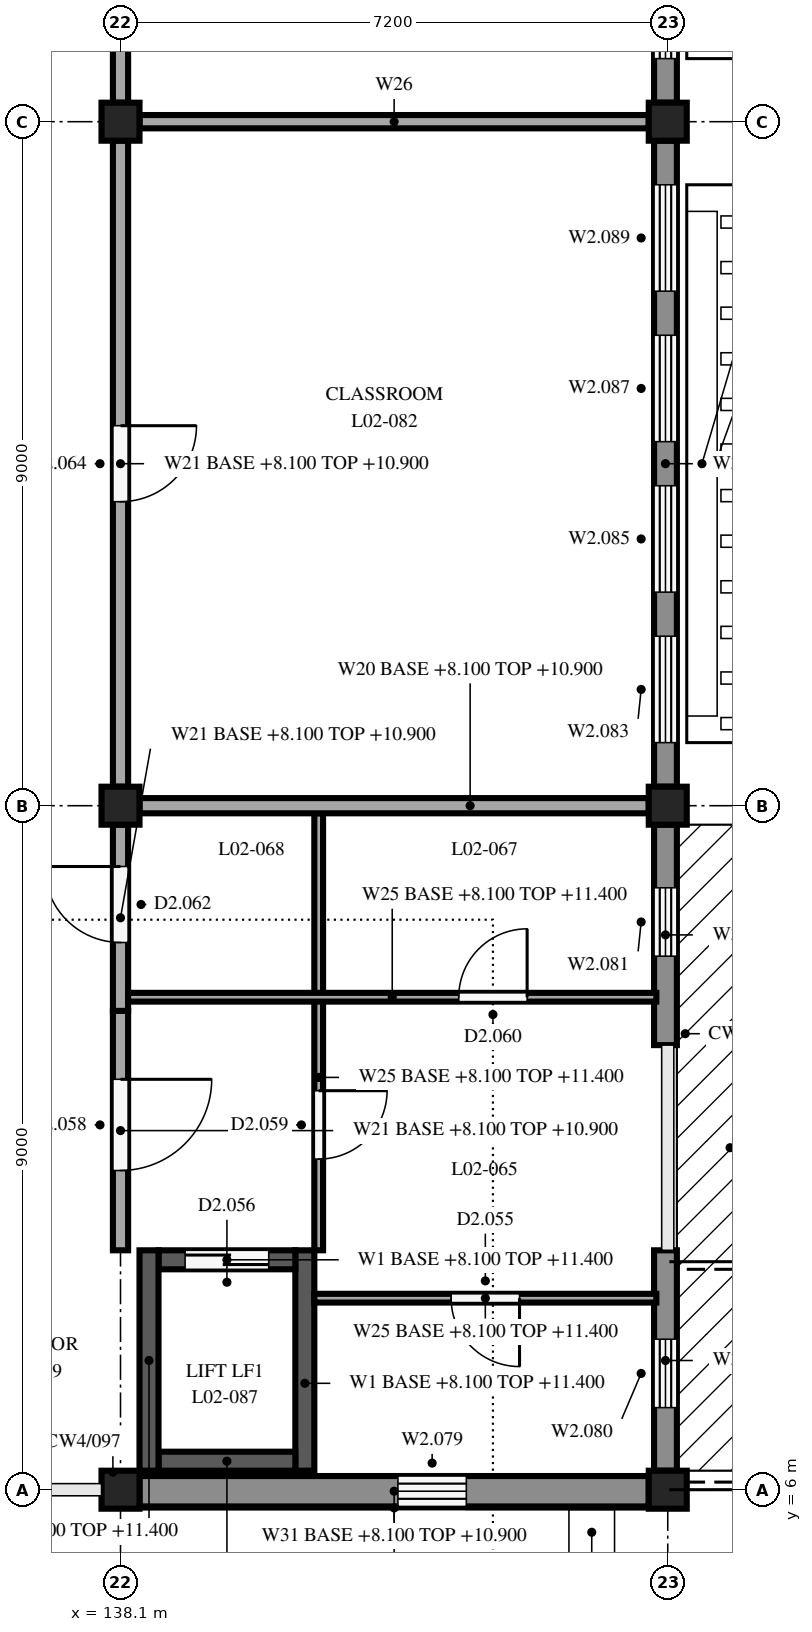
"""IFC4 building model, lengths in metres.
Left out: names, types, materials, properties, quantities, classifications, styles, units other than length and angle.
Written with IfcOpenShell. Run it as: python <this file> out.ifc"""

import sys

from ifc_helpers import new_model, si_unit, direction, frame, frame_2d, origin, origin_2d, place, context, subcontext, project, spatial, rectangle, extrude, element, fill, save


model = new_model("IFC4")
c1 = context("Model", 3, precision=1e-05, world=origin(), true_north=direction((0.0, 1.0)))
c2 = subcontext(c1, "Body", "Model", "MODEL_VIEW")
j1 = project(units=[si_unit("LENGTHUNIT", "METRE"), si_unit("PLANEANGLEUNIT", "RADIAN")], contexts=[c1])
p1 = place(None, origin())
s1 = spatial("IfcSite", under=j1, at=p1, CompositionType="ELEMENT")
p2 = place(p1, origin())
s2 = spatial("IfcBuilding", under=s1, at=p2, CompositionType="ELEMENT")
p3 = place(p2, frame((0.0, 0.0, 8.1)))
s3 = spatial("IfcBuildingStorey", under=s2, at=p3, CompositionType="ELEMENT", Elevation=8.1)
for number, where, z_axis, x_axis in (
    (1, (138.1, 6.0, 0.0), (0.0, 0.0, 1.0), (1.0, 0.0, 0.0)),
    (2, (138.1, 15.0, 0.0), (0.0, 0.0, 1.0), (1.0, 0.0, 0.0)),
    (3, (138.1, 24.0, 0.0), (0.0, 0.0, 1.0), (1.0, 0.0, 0.0)),
    (4, (145.3, 6.0, 0.0), (0.0, 0.0, 1.0), (1.0, 0.0, 0.0)),
    (5, (145.3, 15.0, 0.0), (0.0, 0.0, 1.0), (1.0, 0.0, 0.0)),
    (6, (145.3, 24.0, 0.0), (0.0, 0.0, 1.0), (1.0, 0.0, 0.0)),
):
    element("IfcColumn", number, at=place(p3, frame(where, z_axis=z_axis, x_axis=x_axis)), inside=s3, PredefinedType="COLUMN", context=c2, shape_type="SweptSolid", body=[
        extrude(rectangle(XDim=0.5, YDim=0.5, at=origin_2d()), origin(), (0.0, 0.0, 1.0), 3.3),
    ])
for number, where, z_axis, x_axis in (
    (7, (138.475, 6.25, 0.0), (0.0, 0.0, 1.0), (0.0, 1.0, 0.0)),
    (8, (140.525, 6.25, 0.0), (0.0, 0.0, 1.0), (0.0, 1.0, 0.0)),
):
    element("IfcWall", number, at=place(p3, frame(where, z_axis=z_axis, x_axis=x_axis)), inside=s3, PredefinedType="SHEAR", context=c2, shape_type="SweptSolid", body=[
        extrude(rectangle(XDim=2.9, YDim=0.25, at=frame_2d((1.45, 0.0))), origin(), (0.0, 0.0, 1.0), 3.3),
    ])
p4 = place(p3, frame((138.6, 6.375, 0.0), z_axis=(0.0, 0.0, 1.0), x_axis=(1.0, 0.0, 0.0)))
e9 = element("IfcWall", 9, at=p4, inside=s3, PredefinedType="SHEAR", context=c2, shape_type="SweptSolid", body=[
    extrude(rectangle(XDim=1.8, YDim=0.25, at=frame_2d((0.9, 0.0))), origin(), (0.0, 0.0, 1.0), 3.3),
])
p5 = place(p3, frame((138.6, 9.025, 0.0), z_axis=(0.0, 0.0, 1.0), x_axis=(1.0, 0.0, 0.0)))
e10 = element("IfcWall", 10, at=p5, inside=s3, PredefinedType="SHEAR", context=c2, shape_type="SweptSolid", body=[
    extrude(rectangle(XDim=1.8, YDim=0.25, at=frame_2d((0.9, 0.0))), origin(), (0.0, 0.0, 1.0), 3.3),
])
p6 = place(p5, frame((0.35, 0.0, 0.0)))
e11 = element("IfcOpeningElement", 11, at=p6, cuts=e10, PredefinedType="OPENING", context=c2, shape_type="SweptSolid", body=[
    extrude(rectangle(XDim=1.1, YDim=2.1, at=frame_2d((0.55, 1.05))), frame((0.0, 0.135, 0.0), z_axis=(0.0, -1.0, 0.0), x_axis=(1.0, 0.0, 0.0)), (0.0, 0.0, 1.0), 0.27),
])
p7 = place(p3, frame((145.27, 9.15, 0.0), z_axis=(0.0, 0.0, 1.0), x_axis=(0.0, -1.0, 0.0)))
e12 = element("IfcWall", 12, at=p7, inside=s3, PredefinedType="STANDARD", context=c2, shape_type="SweptSolid", body=[
    extrude(rectangle(XDim=2.9, YDim=0.3, at=frame_2d((1.45, 0.0))), origin(), (0.0, 0.0, 1.0), 2.75),
])
p8 = place(p7, frame((1.17, 0.0, 1.6)))
e13 = element("IfcOpeningElement", 13, at=p8, cuts=e12, PredefinedType="OPENING", context=c2, shape_type="SweptSolid", body=[
    extrude(rectangle(XDim=0.9, YDim=1.0, at=frame_2d((0.45, 0.5))), frame((0.0, 0.16, 0.0), z_axis=(0.0, -1.0, 0.0), x_axis=(1.0, 0.0, 0.0)), (0.0, 0.0, 1.0), 0.32),
])
p9 = place(p3, frame((145.27, 14.75, 0.0), z_axis=(0.0, 0.0, 1.0), x_axis=(0.0, -1.0, 0.0)))
e14 = element("IfcWall", 14, at=p9, inside=s3, PredefinedType="STANDARD", context=c2, shape_type="SweptSolid", body=[
    extrude(rectangle(XDim=2.9, YDim=0.3, at=frame_2d((1.45, 0.0))), origin(), (0.0, 0.0, 1.0), 2.75),
])
p10 = place(p9, frame((0.83, 0.0, 1.6)))
e15 = element("IfcOpeningElement", 15, at=p10, cuts=e14, PredefinedType="OPENING", context=c2, shape_type="SweptSolid", body=[
    extrude(rectangle(XDim=0.9, YDim=1.0, at=frame_2d((0.45, 0.5))), frame((0.0, 0.16, 0.0), z_axis=(0.0, -1.0, 0.0), x_axis=(1.0, 0.0, 0.0)), (0.0, 0.0, 1.0), 0.32),
])
p11 = place(p3, frame((145.27, 23.75, 0.0), z_axis=(0.0, 0.0, 1.0), x_axis=(0.0, -1.0, 0.0)))
e16 = element("IfcWall", 16, at=p11, inside=s3, PredefinedType="STANDARD", context=c2, shape_type="SweptSolid", body=[
    extrude(rectangle(XDim=8.5, YDim=0.3, at=frame_2d((4.25, 0.0))), origin(), (0.0, 0.0, 1.0), 2.75),
])
p12 = place(p11, frame((6.52, 0.0, 0.6)))
e17 = element("IfcOpeningElement", 17, at=p12, cuts=e16, PredefinedType="OPENING", context=c2, shape_type="SweptSolid", body=[
    extrude(rectangle(XDim=1.4, YDim=2.1, at=frame_2d((0.7, 1.05))), frame((0.0, 0.16, 0.0), z_axis=(0.0, -1.0, 0.0), x_axis=(1.0, 0.0, 0.0)), (0.0, 0.0, 1.0), 0.32),
])
p13 = place(p11, frame((4.54, 0.0, 0.6)))
e18 = element("IfcOpeningElement", 18, at=p13, cuts=e16, PredefinedType="OPENING", context=c2, shape_type="SweptSolid", body=[
    extrude(rectangle(XDim=1.4, YDim=2.1, at=frame_2d((0.7, 1.05))), frame((0.0, 0.16, 0.0), z_axis=(0.0, -1.0, 0.0), x_axis=(1.0, 0.0, 0.0)), (0.0, 0.0, 1.0), 0.32),
])
p14 = place(p11, frame((2.56, 0.0, 0.6)))
e19 = element("IfcOpeningElement", 19, at=p14, cuts=e16, PredefinedType="OPENING", context=c2, shape_type="SweptSolid", body=[
    extrude(rectangle(XDim=1.4, YDim=2.1, at=frame_2d((0.7, 1.05))), frame((0.0, 0.16, 0.0), z_axis=(0.0, -1.0, 0.0), x_axis=(1.0, 0.0, 0.0)), (0.0, 0.0, 1.0), 0.32),
])
p15 = place(p11, frame((0.58, 0.0, 0.6)))
e20 = element("IfcOpeningElement", 20, at=p15, cuts=e16, PredefinedType="OPENING", context=c2, shape_type="SweptSolid", body=[
    extrude(rectangle(XDim=1.4, YDim=2.1, at=frame_2d((0.7, 1.05))), frame((0.0, 0.16, 0.0), z_axis=(0.0, -1.0, 0.0), x_axis=(1.0, 0.0, 0.0)), (0.0, 0.0, 1.0), 0.32),
])
p16 = place(p3, frame((145.27, 32.75, 0.0), z_axis=(0.0, 0.0, 1.0), x_axis=(0.0, -1.0, 0.0)))
e21 = element("IfcWall", 21, at=p16, inside=s3, PredefinedType="STANDARD", context=c2, shape_type="SweptSolid", body=[
    extrude(rectangle(XDim=8.5, YDim=0.3, at=frame_2d((4.25, 0.0))), origin(), (0.0, 0.0, 1.0), 2.75),
])
p17 = place(p16, frame((6.52, 0.0, 0.6)))
e22 = element("IfcOpeningElement", 22, at=p17, cuts=e21, PredefinedType="OPENING", context=c2, shape_type="SweptSolid", body=[
    extrude(rectangle(XDim=1.4, YDim=2.1, at=frame_2d((0.7, 1.05))), frame((0.0, 0.16, 0.0), z_axis=(0.0, -1.0, 0.0), x_axis=(1.0, 0.0, 0.0)), (0.0, 0.0, 1.0), 0.32),
])
p18 = place(p16, frame((4.54, 0.0, 0.6)))
e23 = element("IfcOpeningElement", 23, at=p18, cuts=e21, PredefinedType="OPENING", context=c2, shape_type="SweptSolid", body=[
    extrude(rectangle(XDim=1.4, YDim=2.1, at=frame_2d((0.7, 1.05))), frame((0.0, 0.16, 0.0), z_axis=(0.0, -1.0, 0.0), x_axis=(1.0, 0.0, 0.0)), (0.0, 0.0, 1.0), 0.32),
])
p19 = place(p16, frame((2.56, 0.0, 0.6)))
e24 = element("IfcOpeningElement", 24, at=p19, cuts=e21, PredefinedType="OPENING", context=c2, shape_type="SweptSolid", body=[
    extrude(rectangle(XDim=1.4, YDim=2.1, at=frame_2d((0.7, 1.05))), frame((0.0, 0.16, 0.0), z_axis=(0.0, -1.0, 0.0), x_axis=(1.0, 0.0, 0.0)), (0.0, 0.0, 1.0), 0.32),
])
p20 = place(p16, frame((0.58, 0.0, 0.6)))
e25 = element("IfcOpeningElement", 25, at=p20, cuts=e21, PredefinedType="OPENING", context=c2, shape_type="SweptSolid", body=[
    extrude(rectangle(XDim=1.4, YDim=2.1, at=frame_2d((0.7, 1.05))), frame((0.0, 0.16, 0.0), z_axis=(0.0, -1.0, 0.0), x_axis=(1.0, 0.0, 0.0)), (0.0, 0.0, 1.0), 0.32),
])
p21 = place(p3, frame((145.05, 5.98, 0.0), z_axis=(0.0, 0.0, 1.0), x_axis=(-1.0, 0.0, 0.0)))
e26 = element("IfcWall", 26, at=p21, inside=s3, PredefinedType="STANDARD", context=c2, shape_type="SweptSolid", body=[
    extrude(rectangle(XDim=6.7, YDim=0.4, at=frame_2d((3.35, 0.0))), origin(), (0.0, 0.0, 1.0), 2.8),
])
p22 = place(p21, frame((2.4, 0.0, 1.6)))
e27 = element("IfcOpeningElement", 27, at=p22, cuts=e26, PredefinedType="OPENING", context=c2, shape_type="SweptSolid", body=[
    extrude(rectangle(XDim=0.9, YDim=1.0, at=frame_2d((0.45, 0.5))), frame((0.0, 0.21, 0.0), z_axis=(0.0, -1.0, 0.0), x_axis=(1.0, 0.0, 0.0)), (0.0, 0.0, 1.0), 0.42),
])
p23 = place(p3, frame((138.1, 12.3, 0.0), z_axis=(0.0, 0.0, 1.0), x_axis=(0.0, -1.0, 0.0)))
e28 = element("IfcWall", 28, at=p23, inside=s3, PredefinedType="PARTITIONING", context=c2, shape_type="SweptSolid", body=[
    extrude(rectangle(XDim=3.15, YDim=0.2, at=frame_2d((1.575, 0.0))), origin(), (0.0, 0.0, 1.0), 2.8),
])
p24 = place(p23, frame((0.9, 0.0, 0.0)))
e29 = element("IfcOpeningElement", 29, at=p24, cuts=e28, PredefinedType="OPENING", context=c2, shape_type="SweptSolid", body=[
    extrude(rectangle(XDim=1.2, YDim=2.1, at=frame_2d((0.6, 1.05))), frame((0.0, 0.11, 0.0), z_axis=(0.0, -1.0, 0.0), x_axis=(1.0, 0.0, 0.0)), (0.0, 0.0, 1.0), 0.22),
])
p25 = place(p3, frame((138.1, 12.3, 0.0), z_axis=(0.0, 0.0, 1.0), x_axis=(0.0, 1.0, 0.0)))
e30 = element("IfcWall", 30, at=p25, inside=s3, PredefinedType="PARTITIONING", context=c2, shape_type="SweptSolid", body=[
    extrude(rectangle(XDim=2.45, YDim=0.2, at=frame_2d((1.225, 0.0))), origin(), (0.0, 0.0, 1.0), 2.8),
])
p26 = place(p25, frame((0.9, 0.0, 0.0)))
e31 = element("IfcOpeningElement", 31, at=p26, cuts=e30, PredefinedType="OPENING", context=c2, shape_type="SweptSolid", body=[
    extrude(rectangle(XDim=1.0, YDim=2.1, at=frame_2d((0.5, 1.05))), frame((0.0, 0.11, 0.0), z_axis=(0.0, -1.0, 0.0), x_axis=(1.0, 0.0, 0.0)), (0.0, 0.0, 1.0), 0.22),
])
p27 = place(p3, frame((138.35, 15.0, 0.0), z_axis=(0.0, 0.0, 1.0), x_axis=(1.0, 0.0, 0.0)))
e32 = element("IfcWall", 32, at=p27, inside=s3, PredefinedType="PARTITIONING", context=c2, shape_type="SweptSolid", body=[
    extrude(rectangle(XDim=6.7, YDim=0.2, at=frame_2d((3.35, 0.0))), origin(), (0.0, 0.0, 1.0), 2.8),
])
p28 = place(p3, frame((140.708, 14.9, 0.0), z_axis=(0.0, 0.0, 1.0), x_axis=(0.0, -1.0, 0.0)))
e33 = element("IfcWall", 33, at=p28, inside=s3, PredefinedType="PARTITIONING", context=c2, shape_type="SweptSolid", body=[
    extrude(rectangle(XDim=5.75, YDim=0.115, at=frame_2d((2.875, 0.0))), origin(), (0.0, 0.0, 1.0), 3.3),
])
p29 = place(p28, frame((3.65, 0.0, 0.0)))
e34 = element("IfcOpeningElement", 34, at=p29, cuts=e33, PredefinedType="OPENING", context=c2, shape_type="SweptSolid", body=[
    extrude(rectangle(XDim=0.9, YDim=2.1, at=frame_2d((0.45, 1.05))), frame((0.0, 0.067, 0.0), z_axis=(0.0, -1.0, 0.0), x_axis=(1.0, 0.0, 0.0)), (0.0, 0.0, 1.0), 0.135),
])
p30 = place(p3, frame((145.15, 8.52, 0.0), z_axis=(0.0, 0.0, 1.0), x_axis=(-1.0, 0.0, 0.0)))
e35 = element("IfcWall", 35, at=p30, inside=s3, PredefinedType="PARTITIONING", context=c2, shape_type="SweptSolid", body=[
    extrude(rectangle(XDim=4.5, YDim=0.115, at=frame_2d((2.25, 0.0))), origin(), (0.0, 0.0, 1.0), 3.3),
])
p31 = place(p30, frame((1.8, 0.0, 0.0)))
e36 = element("IfcOpeningElement", 36, at=p31, cuts=e35, PredefinedType="OPENING", context=c2, shape_type="SweptSolid", body=[
    extrude(rectangle(XDim=0.9, YDim=2.1, at=frame_2d((0.45, 1.05))), frame((0.0, 0.067, 0.0), z_axis=(0.0, -1.0, 0.0), x_axis=(1.0, 0.0, 0.0)), (0.0, 0.0, 1.0), 0.135),
])
p32 = place(p3, frame((138.2, 12.48, 0.0), z_axis=(0.0, 0.0, 1.0), x_axis=(1.0, 0.0, 0.0)))
e37 = element("IfcWall", 37, at=p32, inside=s3, PredefinedType="PARTITIONING", context=c2, shape_type="SweptSolid", body=[
    extrude(rectangle(XDim=6.95, YDim=0.115, at=frame_2d((3.475, 0.0))), origin(), (0.0, 0.0, 1.0), 3.3),
])
p33 = place(p32, frame((4.35, 0.0, 0.0)))
e38 = element("IfcOpeningElement", 38, at=p33, cuts=e37, PredefinedType="OPENING", context=c2, shape_type="SweptSolid", body=[
    extrude(rectangle(XDim=0.9, YDim=2.1, at=frame_2d((0.45, 1.05))), frame((0.0, 0.067, 0.0), z_axis=(0.0, -1.0, 0.0), x_axis=(1.0, 0.0, 0.0)), (0.0, 0.0, 1.0), 0.135),
])
p34 = place(p3, frame((138.1, 23.75, 0.0), z_axis=(0.0, 0.0, 1.0), x_axis=(0.0, -1.0, 0.0)))
e39 = element("IfcWall", 39, at=p34, inside=s3, PredefinedType="PARTITIONING", context=c2, shape_type="SweptSolid", body=[
    extrude(rectangle(XDim=8.5, YDim=0.2, at=frame_2d((4.25, 0.0))), origin(), (0.0, 0.0, 1.0), 2.8),
])
p35 = place(p34, frame((3.75, 0.0, 0.0)))
e40 = element("IfcOpeningElement", 40, at=p35, cuts=e39, PredefinedType="OPENING", context=c2, shape_type="SweptSolid", body=[
    extrude(rectangle(XDim=1.0, YDim=2.1, at=frame_2d((0.5, 1.05))), frame((0.0, 0.11, 0.0), z_axis=(0.0, -1.0, 0.0), x_axis=(1.0, 0.0, 0.0)), (0.0, 0.0, 1.0), 0.22),
])
p36 = place(p3, frame((138.1, 32.75, 0.0), z_axis=(0.0, 0.0, 1.0), x_axis=(0.0, -1.0, 0.0)))
e41 = element("IfcWall", 41, at=p36, inside=s3, PredefinedType="PARTITIONING", context=c2, shape_type="SweptSolid", body=[
    extrude(rectangle(XDim=8.5, YDim=0.2, at=frame_2d((4.25, 0.0))), origin(), (0.0, 0.0, 1.0), 2.8),
])
p37 = place(p36, frame((3.75, 0.0, 0.0)))
e42 = element("IfcOpeningElement", 42, at=p37, cuts=e41, PredefinedType="OPENING", context=c2, shape_type="SweptSolid", body=[
    extrude(rectangle(XDim=1.0, YDim=2.1, at=frame_2d((0.5, 1.05))), frame((0.0, 0.11, 0.0), z_axis=(0.0, -1.0, 0.0), x_axis=(1.0, 0.0, 0.0)), (0.0, 0.0, 1.0), 0.22),
])
p38 = place(p3, frame((138.35, 24.0, 0.0), z_axis=(0.0, 0.0, 1.0), x_axis=(1.0, 0.0, 0.0)))
e43 = element("IfcWall", 43, at=p38, inside=s3, PredefinedType="PARTITIONING", context=c2, shape_type="SweptSolid", body=[
    extrude(rectangle(XDim=6.7, YDim=0.175, at=frame_2d((3.35, 0.0))), origin(), (0.0, 0.0, 1.0), 2.8),
])
p39 = place(p8, origin())
e44 = element("IfcWindow", 44, at=p39, inside=s3, PartitioningType="SINGLE_PANEL", PredefinedType="WINDOW", context=c2, shape_type="SweptSolid", body=[
    extrude(rectangle(XDim=0.9, YDim=1.0, at=frame_2d((0.45, 0.5))), frame((0.0, 0.03, 0.0), z_axis=(0.0, -1.0, 0.0), x_axis=(1.0, 0.0, 0.0)), (0.0, 0.0, 1.0), 0.06),
])
fill(e13, e44)
p40 = place(p10, origin())
e45 = element("IfcWindow", 45, at=p40, inside=s3, PartitioningType="SINGLE_PANEL", PredefinedType="WINDOW", context=c2, shape_type="SweptSolid", body=[
    extrude(rectangle(XDim=0.9, YDim=1.0, at=frame_2d((0.45, 0.5))), frame((0.0, 0.03, 0.0), z_axis=(0.0, -1.0, 0.0), x_axis=(1.0, 0.0, 0.0)), (0.0, 0.0, 1.0), 0.06),
])
fill(e15, e45)
p41 = place(p12, origin())
e46 = element("IfcWindow", 46, at=p41, inside=s3, PartitioningType="DOUBLE_PANEL_VERTICAL", PredefinedType="WINDOW", context=c2, shape_type="SweptSolid", body=[
    extrude(rectangle(XDim=1.4, YDim=2.1, at=frame_2d((0.7, 1.05))), frame((0.0, 0.03, 0.0), z_axis=(0.0, -1.0, 0.0), x_axis=(1.0, 0.0, 0.0)), (0.0, 0.0, 1.0), 0.06),
])
fill(e17, e46)
p42 = place(p13, origin())
e47 = element("IfcWindow", 47, at=p42, inside=s3, PartitioningType="DOUBLE_PANEL_VERTICAL", PredefinedType="WINDOW", context=c2, shape_type="SweptSolid", body=[
    extrude(rectangle(XDim=1.4, YDim=2.1, at=frame_2d((0.7, 1.05))), frame((0.0, 0.03, 0.0), z_axis=(0.0, -1.0, 0.0), x_axis=(1.0, 0.0, 0.0)), (0.0, 0.0, 1.0), 0.06),
])
fill(e18, e47)
p43 = place(p14, origin())
e48 = element("IfcWindow", 48, at=p43, inside=s3, PartitioningType="DOUBLE_PANEL_VERTICAL", PredefinedType="WINDOW", context=c2, shape_type="SweptSolid", body=[
    extrude(rectangle(XDim=1.4, YDim=2.1, at=frame_2d((0.7, 1.05))), frame((0.0, 0.03, 0.0), z_axis=(0.0, -1.0, 0.0), x_axis=(1.0, 0.0, 0.0)), (0.0, 0.0, 1.0), 0.06),
])
fill(e19, e48)
p44 = place(p15, origin())
e49 = element("IfcWindow", 49, at=p44, inside=s3, PartitioningType="DOUBLE_PANEL_VERTICAL", PredefinedType="WINDOW", context=c2, shape_type="SweptSolid", body=[
    extrude(rectangle(XDim=1.4, YDim=2.1, at=frame_2d((0.7, 1.05))), frame((0.0, 0.03, 0.0), z_axis=(0.0, -1.0, 0.0), x_axis=(1.0, 0.0, 0.0)), (0.0, 0.0, 1.0), 0.06),
])
fill(e20, e49)
p45 = place(p17, origin())
e50 = element("IfcWindow", 50, at=p45, inside=s3, PartitioningType="DOUBLE_PANEL_VERTICAL", PredefinedType="WINDOW", context=c2, shape_type="SweptSolid", body=[
    extrude(rectangle(XDim=1.4, YDim=2.1, at=frame_2d((0.7, 1.05))), frame((0.0, 0.03, 0.0), z_axis=(0.0, -1.0, 0.0), x_axis=(1.0, 0.0, 0.0)), (0.0, 0.0, 1.0), 0.06),
])
fill(e22, e50)
p46 = place(p22, origin())
e51 = element("IfcWindow", 51, at=p46, inside=s3, PartitioningType="SINGLE_PANEL", PredefinedType="WINDOW", context=c2, shape_type="SweptSolid", body=[
    extrude(rectangle(XDim=0.9, YDim=1.0, at=frame_2d((0.45, 0.5))), frame((0.0, 0.03, 0.0), z_axis=(0.0, -1.0, 0.0), x_axis=(1.0, 0.0, 0.0)), (0.0, 0.0, 1.0), 0.06),
])
fill(e27, e51)
p47 = place(p24, origin())
e52 = element("IfcDoor", 52, at=p47, inside=s3, OperationType="SINGLE_SWING_LEFT", PredefinedType="DOOR", context=c2, shape_type="SweptSolid", body=[
    extrude(rectangle(XDim=1.2, YDim=2.1, at=frame_2d((0.6, 1.05))), frame((0.0, 0.025, 0.0), z_axis=(0.0, -1.0, 0.0), x_axis=(1.0, 0.0, 0.0)), (0.0, 0.0, 1.0), 0.05),
])
fill(e29, e52)
p48 = place(p26, origin())
e53 = element("IfcDoor", 53, at=p48, inside=s3, OperationType="SINGLE_SWING_RIGHT", PredefinedType="DOOR", context=c2, shape_type="SweptSolid", body=[
    extrude(rectangle(XDim=1.0, YDim=2.1, at=frame_2d((0.5, 1.05))), frame((0.0, 0.025, 0.0), z_axis=(0.0, -1.0, 0.0), x_axis=(1.0, 0.0, 0.0)), (0.0, 0.0, 1.0), 0.05),
])
fill(e31, e53)
p49 = place(p29, origin())
e54 = element("IfcDoor", 54, at=p49, inside=s3, OperationType="SINGLE_SWING_LEFT", PredefinedType="DOOR", context=c2, shape_type="SweptSolid", body=[
    extrude(rectangle(XDim=0.9, YDim=2.1, at=frame_2d((0.45, 1.05))), frame((0.0, 0.025, 0.0), z_axis=(0.0, -1.0, 0.0), x_axis=(1.0, 0.0, 0.0)), (0.0, 0.0, 1.0), 0.05),
])
fill(e34, e54)
p50 = place(p31, origin())
e55 = element("IfcDoor", 55, at=p50, inside=s3, OperationType="SINGLE_SWING_LEFT", PredefinedType="DOOR", context=c2, shape_type="SweptSolid", body=[
    extrude(rectangle(XDim=0.9, YDim=2.1, at=frame_2d((0.45, 1.05))), frame((0.0, 0.025, 0.0), z_axis=(0.0, -1.0, 0.0), x_axis=(1.0, 0.0, 0.0)), (0.0, 0.0, 1.0), 0.05),
])
fill(e36, e55)
p51 = place(p33, origin())
e56 = element("IfcDoor", 56, at=p51, inside=s3, OperationType="SINGLE_SWING_RIGHT", PredefinedType="DOOR", context=c2, shape_type="SweptSolid", body=[
    extrude(rectangle(XDim=0.9, YDim=2.1, at=frame_2d((0.45, 1.05))), frame((0.0, 0.025, 0.0), z_axis=(0.0, -1.0, 0.0), x_axis=(1.0, 0.0, 0.0)), (0.0, 0.0, 1.0), 0.05),
])
fill(e38, e56)
p52 = place(p35, origin())
e57 = element("IfcDoor", 57, at=p52, inside=s3, OperationType="SINGLE_SWING_LEFT", PredefinedType="DOOR", context=c2, shape_type="SweptSolid", body=[
    extrude(rectangle(XDim=1.0, YDim=2.1, at=frame_2d((0.5, 1.05))), frame((0.0, 0.025, 0.0), z_axis=(0.0, -1.0, 0.0), x_axis=(1.0, 0.0, 0.0)), (0.0, 0.0, 1.0), 0.05),
])
fill(e40, e57)
p53 = place(p6, origin())
e58 = element("IfcDoor", 58, at=p53, inside=s3, OperationType="SLIDING_TO_LEFT", PredefinedType="DOOR", context=c2, shape_type="SweptSolid", body=[
    extrude(rectangle(XDim=1.1, YDim=2.1, at=frame_2d((0.55, 1.05))), frame((0.0, 0.025, 0.0), z_axis=(0.0, -1.0, 0.0), x_axis=(1.0, 0.0, 0.0)), (0.0, 0.0, 1.0), 0.05),
])
fill(e11, e58)
save(model, sys.argv[1])
